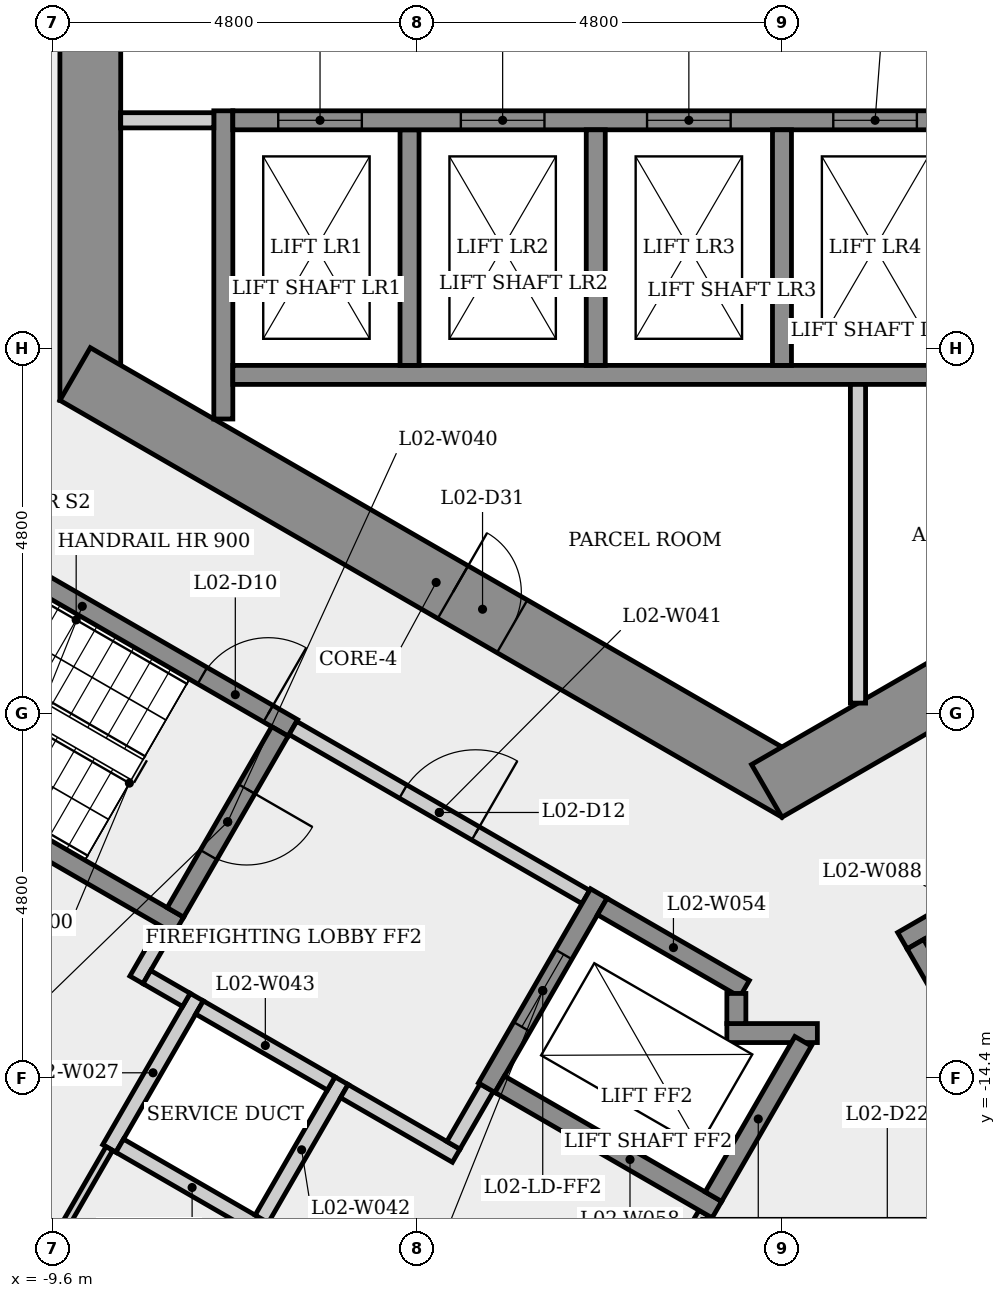
"""IFC4 building model, lengths in metres.
Left out: names, types, materials, properties, quantities, classifications, styles, units other than length and angle.
Written with IfcOpenShell. Run it as: python <this file> out.ifc"""

import sys

from ifc_helpers import new_model, si_unit, direction, frame, frame_2d, origin, place, context, subcontext, project, spatial, rectangle, extrude, element, fill, save


model = new_model("IFC4")
c1 = context("Model", 3, precision=1e-05, world=origin(), true_north=direction((0.0, 1.0)))
c2 = subcontext(c1, "Body", "Model", "MODEL_VIEW")
j1 = project(units=[si_unit("LENGTHUNIT", "METRE"), si_unit("PLANEANGLEUNIT", "RADIAN")], contexts=[c1])
p1 = place(None, origin())
s1 = spatial("IfcSite", under=j1, at=p1, CompositionType="ELEMENT")
p2 = place(p1, origin())
s2 = spatial("IfcBuilding", under=s1, at=p2, CompositionType="ELEMENT")
p3 = place(p2, frame((0.0, 0.0, 11.5)))
s3 = spatial("IfcBuildingStorey", under=s2, at=p3, CompositionType="ELEMENT", Elevation=11.5)
p4 = place(p3, frame((-9.1, 5.485, 0.0), z_axis=(0.0, 0.0, 1.0), x_axis=(0.0, -1.0, 0.0)))
e1 = element("IfcWall", 1, at=p4, inside=s3, PredefinedType="SHEAR", context=c2, shape_type="SweptSolid", body=[
    extrude(rectangle(XDim=10.97, YDim=0.8, at=frame_2d((5.485, 0.0))), origin(), (0.0, 0.0, 1.0), 4.5),
])
p5 = place(p4, frame((4.685, 0.0, 0.0)))
e2 = element("IfcOpeningElement", 2, at=p5, cuts=e1, PredefinedType="OPENING", context=c2, shape_type="SweptSolid", body=[
    extrude(rectangle(XDim=1.6, YDim=2.1, at=frame_2d((0.8, 1.05))), frame((0.0, 0.41, 0.0), z_axis=(0.0, -1.0, 0.0), x_axis=(1.0, 0.0, 0.0)), (0.0, 0.0, 1.0), 0.82),
])
p6 = place(p3, frame((-9.3, -5.138, 0.0), z_axis=(0.0, 0.0, 1.0), x_axis=(0.866023993627, -0.500002442456, 0.0)))
e3 = element("IfcWall", 3, at=p6, inside=s3, PredefinedType="SHEAR", context=c2, shape_type="SweptSolid", body=[
    extrude(rectangle(XDim=10.97, YDim=0.8, at=frame_2d((5.485, 0.0))), origin(), (0.0, 0.0, 1.0), 4.5),
])
p7 = place(p6, frame((5.74, 0.0, 0.0)))
e4 = element("IfcOpeningElement", 4, at=p7, cuts=e3, PredefinedType="OPENING", context=c2, shape_type="SweptSolid", body=[
    extrude(rectangle(XDim=0.9, YDim=2.1, at=frame_2d((0.45, 1.05))), frame((0.0, 0.41, 0.0), z_axis=(0.0, -1.0, 0.0), x_axis=(1.0, 0.0, 0.0)), (0.0, 0.0, 1.0), 0.82),
])
p8 = place(p3, frame((-0.2, -10.623, 0.0), z_axis=(0.0, 0.0, 1.0), x_axis=(0.866023993627, 0.500002442456, 0.0)))
e5 = element("IfcWall", 5, at=p8, inside=s3, PredefinedType="SHEAR", context=c2, shape_type="SweptSolid", body=[
    extrude(rectangle(XDim=10.97, YDim=0.8, at=frame_2d((5.485, 0.0))), origin(), (0.0, 0.0, 1.0), 4.5),
])
p9 = place(p8, frame((7.224, 0.0, 0.0)))
e6 = element("IfcOpeningElement", 6, at=p9, cuts=e5, PredefinedType="OPENING", context=c2, shape_type="SweptSolid", body=[
    extrude(rectangle(XDim=0.9, YDim=2.1, at=frame_2d((0.45, 1.05))), frame((0.0, 0.41, 0.0), z_axis=(0.0, -1.0, 0.0), x_axis=(1.0, 0.0, 0.0)), (0.0, 0.0, 1.0), 0.82),
])
p10 = place(p3, frame((-11.977, -6.595, 0.0), z_axis=(0.0, 0.0, 1.0), x_axis=(0.866025499775, -0.499999833739, 0.0)))
e7 = element("IfcWall", 7, at=p10, inside=s3, PredefinedType="SHEAR", context=c2, shape_type="SweptSolid", body=[
    extrude(rectangle(XDim=6.4, YDim=0.25, at=frame_2d((3.2, 0.0))), origin(), (0.0, 0.0, 1.0), 4.1),
])
p11 = place(p10, frame((5.025, 0.0, 0.0)))
e8 = element("IfcOpeningElement", 8, at=p11, cuts=e7, PredefinedType="OPENING", context=c2, shape_type="SweptSolid", body=[
    extrude(rectangle(XDim=1.0, YDim=2.1, at=frame_2d((0.5, 1.05))), frame((0.0, 0.135, 0.0), z_axis=(0.0, -1.0, 0.0), x_axis=(1.0, 0.0, 0.0)), (0.0, 0.0, 1.0), 0.27),
])
p12 = place(p3, frame((-8.85, -15.329, 0.0), z_axis=(0.0, 0.0, 1.0), x_axis=(0.500077740698, 0.865980515519, 0.0)))
e9 = element("IfcWall", 9, at=p12, inside=s3, PredefinedType="PLUMBINGWALL", context=c2, shape_type="SweptSolid", body=[
    extrude(rectangle(XDim=2.3, YDim=0.2, at=frame_2d((1.15, 0.0))), origin(), (0.0, 0.0, 1.0), 4.1),
])
p13 = place(p3, frame((-8.85, -15.329, 0.0), z_axis=(0.0, 0.0, 1.0), x_axis=(-0.499991453095, -0.866030338286, 0.0)))
e10 = element("IfcWall", 10, at=p13, inside=s3, PredefinedType="PARTITIONING", context=c2, shape_type="SweptSolid", body=[
    extrude(rectangle(XDim=3.98, YDim=0.1, at=frame_2d((1.99, 0.0))), origin(), (0.0, 0.0, 1.0), 4.1),
])
p14 = place(p3, frame((-8.493, -13.11, 0.0), z_axis=(0.0, 0.0, 1.0), x_axis=(0.500067724834, 0.865986299303, 0.0)))
e11 = element("IfcWall", 11, at=p14, inside=s3, PredefinedType="PARTITIONING", context=c2, shape_type="SweptSolid", body=[
    extrude(rectangle(XDim=0.775, YDim=0.2, at=frame_2d((0.388, 0.0))), origin(), (0.0, 0.0, 1.0), 4.1),
])
p15 = place(p3, frame((-7.935, -12.393, 0.0), z_axis=(0.0, 0.0, 1.0), x_axis=(-0.866025499775, 0.499999833739, 0.0)))
e12 = element("IfcWall", 12, at=p15, inside=s3, PredefinedType="SHEAR", context=c2, shape_type="SweptSolid", body=[
    extrude(rectangle(XDim=6.4, YDim=0.25, at=frame_2d((3.2, 0.0))), origin(), (0.0, 0.0, 1.0), 4.1),
])
p16 = place(p3, frame((-7.836, -13.373, 0.0), z_axis=(0.0, 0.0, 1.0), x_axis=(-0.866232998003, 0.499640263761, 0.0)))
e13 = element("IfcWall", 13, at=p16, inside=s3, PredefinedType="PARTITIONING", context=c2, shape_type="SweptSolid", body=[
    extrude(rectangle(XDim=0.6, YDim=0.2, at=frame_2d((0.3, 0.0))), origin(), (0.0, 0.0, 1.0), 4.1),
])
p17 = place(p3, frame((-7.35, -5.73, 0.0), z_axis=(0.0, 0.0, 1.0), x_axis=(0.0, 1.0, 0.0)))
e14 = element("IfcWall", 14, at=p17, inside=s3, PredefinedType="SHEAR", context=c2, shape_type="SweptSolid", body=[
    extrude(rectangle(XDim=4.055, YDim=0.25, at=frame_2d((2.028, 0.0))), origin(), (0.0, 0.0, 1.0), 4.1),
])
p18 = place(p3, frame((-7.475, -1.8, 0.0), z_axis=(0.0, 0.0, 1.0), x_axis=(-1.0, 0.0, 0.0)))
e15 = element("IfcWall", 15, at=p18, inside=s3, PredefinedType="PARTITIONING", context=c2, shape_type="SweptSolid", body=[
    extrude(rectangle(XDim=1.225, YDim=0.2, at=frame_2d((0.613, 0.0))), origin(), (0.0, 0.0, 1.0), 4.1),
])
p19 = place(p3, frame((-6.808, -16.392, 0.0), z_axis=(0.0, 0.0, 1.0), x_axis=(-0.866008176907, 0.50002983664, 0.0)))
e16 = element("IfcWall", 16, at=p19, inside=s3, PredefinedType="PLUMBINGWALL", context=c2, shape_type="SweptSolid", body=[
    extrude(rectangle(XDim=2.2, YDim=0.2, at=frame_2d((1.1, 0.0))), origin(), (0.0, 0.0, 1.0), 4.1),
])
p20 = place(p3, frame((-6.605, -9.841, 0.0), z_axis=(0.0, 0.0, 1.0), x_axis=(-0.499996545922, -0.866027397988, 0.0)))
e17 = element("IfcWall", 17, at=p20, inside=s3, PredefinedType="SHEAR", context=c2, shape_type="SweptSolid", body=[
    extrude(rectangle(XDim=2.75, YDim=0.25, at=frame_2d((1.375, 0.0))), origin(), (0.0, 0.0, 1.0), 4.1),
])
p21 = place(p20, frame((0.875, 0.0, 0.0)))
e18 = element("IfcOpeningElement", 18, at=p21, cuts=e17, PredefinedType="OPENING", context=c2, shape_type="SweptSolid", body=[
    extrude(rectangle(XDim=1.0, YDim=2.1, at=frame_2d((0.5, 1.05))), frame((0.0, 0.135, 0.0), z_axis=(0.0, -1.0, 0.0), x_axis=(1.0, 0.0, 0.0)), (0.0, 0.0, 1.0), 0.27),
])
p22 = place(p3, frame((-6.435, -9.795, 0.0), z_axis=(0.0, 0.0, 1.0), x_axis=(0.866012907634, -0.500021643343, 0.0)))
e19 = element("IfcWall", 19, at=p22, inside=s3, PredefinedType="PARTITIONING", context=c2, shape_type="SweptSolid", body=[
    extrude(rectangle(XDim=4.45, YDim=0.2, at=frame_2d((2.225, 0.0))), origin(), (0.0, 0.0, 1.0), 4.1),
])
p23 = place(p22, frame((1.675, 0.0, 0.0)))
e20 = element("IfcOpeningElement", 20, at=p23, cuts=e19, PredefinedType="OPENING", context=c2, shape_type="SweptSolid", body=[
    extrude(rectangle(XDim=1.1, YDim=2.1, at=frame_2d((0.55, 1.05))), frame((0.0, 0.11, 0.0), z_axis=(0.0, -1.0, 0.0), x_axis=(1.0, 0.0, 0.0)), (0.0, 0.0, 1.0), 0.22),
])
p24 = place(p3, frame((-5.795, -14.437, 0.0), z_axis=(0.0, 0.0, 1.0), x_axis=(-0.500027713859, -0.866009402589, 0.0)))
e21 = element("IfcWall", 21, at=p24, inside=s3, PredefinedType="PLUMBINGWALL", context=c2, shape_type="SweptSolid", body=[
    extrude(rectangle(XDim=2.1, YDim=0.2, at=frame_2d((1.05, 0.0))), origin(), (0.0, 0.0, 1.0), 4.1),
])
p25 = place(p3, frame((-5.931, -14.473, 0.0), z_axis=(0.0, 0.0, 1.0), x_axis=(-0.866041268327, 0.499972520799, 0.0)))
e22 = element("IfcWall", 22, at=p25, inside=s3, PredefinedType="PLUMBINGWALL", context=c2, shape_type="SweptSolid", body=[
    extrude(rectangle(XDim=2.0, YDim=0.2, at=frame_2d((1.0, 0.0))), origin(), (0.0, 0.0, 1.0), 4.1),
])
p26 = place(p3, frame((-7.225, -5.15, 0.0), z_axis=(0.0, 0.0, 1.0), x_axis=(1.0, 0.0, 0.0)))
e23 = element("IfcWall", 23, at=p26, inside=s3, PredefinedType="SHEAR", context=c2, shape_type="SweptSolid", body=[
    extrude(rectangle(XDim=14.7, YDim=0.25, at=frame_2d((7.35, 0.0))), origin(), (0.0, 0.0, 1.0), 4.1),
])
p27 = place(p3, frame((-4.9, -1.925, 0.0), z_axis=(0.0, 0.0, 1.0), x_axis=(0.0, -1.0, 0.0)))
e24 = element("IfcWall", 24, at=p27, inside=s3, PredefinedType="SHEAR", context=c2, shape_type="SweptSolid", body=[
    extrude(rectangle(XDim=3.1, YDim=0.25, at=frame_2d((1.55, 0.0))), origin(), (0.0, 0.0, 1.0), 4.5),
])
p28 = place(p3, frame((-7.225, -1.8, 0.0), z_axis=(0.0, 0.0, 1.0), x_axis=(1.0, 0.0, 0.0)))
e25 = element("IfcWall", 25, at=p28, inside=s3, PredefinedType="SHEAR", context=c2, shape_type="SweptSolid", body=[
    extrude(rectangle(XDim=14.7, YDim=0.25, at=frame_2d((7.35, 0.0))), origin(), (0.0, 0.0, 1.0), 4.1),
])
p29 = place(p28, frame((0.597, 0.0, 0.0)))
e26 = element("IfcOpeningElement", 26, at=p29, cuts=e25, PredefinedType="OPENING", context=c2, shape_type="SweptSolid", body=[
    extrude(rectangle(XDim=1.1, YDim=2.1, at=frame_2d((0.55, 1.05))), frame((0.0, 0.135, 0.0), z_axis=(0.0, -1.0, 0.0), x_axis=(1.0, 0.0, 0.0)), (0.0, 0.0, 1.0), 0.27),
])
p30 = place(p28, frame((3.0, 0.0, 0.0)))
e27 = element("IfcOpeningElement", 27, at=p30, cuts=e25, PredefinedType="OPENING", context=c2, shape_type="SweptSolid", body=[
    extrude(rectangle(XDim=1.1, YDim=2.1, at=frame_2d((0.55, 1.05))), frame((0.0, 0.135, 0.0), z_axis=(0.0, -1.0, 0.0), x_axis=(1.0, 0.0, 0.0)), (0.0, 0.0, 1.0), 0.27),
])
p31 = place(p28, frame((5.45, 0.0, 0.0)))
e28 = element("IfcOpeningElement", 28, at=p31, cuts=e25, PredefinedType="OPENING", context=c2, shape_type="SweptSolid", body=[
    extrude(rectangle(XDim=1.1, YDim=2.1, at=frame_2d((0.55, 1.05))), frame((0.0, 0.135, 0.0), z_axis=(0.0, -1.0, 0.0), x_axis=(1.0, 0.0, 0.0)), (0.0, 0.0, 1.0), 0.27),
])
p32 = place(p28, frame((7.9, 0.0, 0.0)))
e29 = element("IfcOpeningElement", 29, at=p32, cuts=e25, PredefinedType="OPENING", context=c2, shape_type="SweptSolid", body=[
    extrude(rectangle(XDim=1.1, YDim=2.1, at=frame_2d((0.55, 1.05))), frame((0.0, 0.135, 0.0), z_axis=(0.0, -1.0, 0.0), x_axis=(1.0, 0.0, 0.0)), (0.0, 0.0, 1.0), 0.27),
])
p33 = place(p28, frame((10.35, 0.0, 0.0)))
e30 = element("IfcOpeningElement", 30, at=p33, cuts=e25, PredefinedType="OPENING", context=c2, shape_type="SweptSolid", body=[
    extrude(rectangle(XDim=1.1, YDim=2.1, at=frame_2d((0.55, 1.05))), frame((0.0, 0.135, 0.0), z_axis=(0.0, -1.0, 0.0), x_axis=(1.0, 0.0, 0.0)), (0.0, 0.0, 1.0), 0.27),
])
p34 = place(p3, frame((-4.286, -15.423, 0.0), z_axis=(0.0, 0.0, 1.0), x_axis=(-0.866025371046, 0.500000056704, 0.0)))
e31 = element("IfcWall", 31, at=p34, inside=s3, PredefinedType="PARTITIONING", context=c2, shape_type="SweptSolid", body=[
    extrude(rectangle(XDim=1.7, YDim=0.2, at=frame_2d((0.85, 0.0))), origin(), (0.0, 0.0, 1.0), 4.1),
])
p35 = place(p3, frame((-3.885, -14.529, 0.0), z_axis=(0.0, 0.0, 1.0), x_axis=(-0.499859285417, -0.866106630146, 0.0)))
e32 = element("IfcWall", 32, at=p35, inside=s3, PredefinedType="PARTITIONING", context=c2, shape_type="SweptSolid", body=[
    extrude(rectangle(XDim=0.875, YDim=0.2, at=frame_2d((0.438, 0.0))), origin(), (0.0, 0.0, 1.0), 4.1),
])
p36 = place(p3, frame((-2.41, -11.974, 0.0), z_axis=(0.0, 0.0, 1.0), x_axis=(-0.500001826776, -0.866024349092, 0.0)))
e33 = element("IfcWall", 33, at=p36, inside=s3, PredefinedType="SHEAR", context=c2, shape_type="SweptSolid", body=[
    extrude(rectangle(XDim=2.95, YDim=0.25, at=frame_2d((1.475, 0.0))), origin(), (0.0, 0.0, 1.0), 4.1),
])
p37 = place(p36, frame((0.925, 0.0, 0.0)))
e34 = element("IfcOpeningElement", 34, at=p37, cuts=e33, PredefinedType="OPENING", context=c2, shape_type="SweptSolid", body=[
    extrude(rectangle(XDim=1.1, YDim=2.1, at=frame_2d((0.55, 1.05))), frame((0.0, 0.135, 0.0), z_axis=(0.0, -1.0, 0.0), x_axis=(1.0, 0.0, 0.0)), (0.0, 0.0, 1.0), 0.27),
])
p38 = place(p3, frame((-2.364, -12.145, 0.0), z_axis=(0.0, 0.0, 1.0), x_axis=(0.86603892542, -0.499976579108, 0.0)))
e35 = element("IfcWall", 35, at=p38, inside=s3, PredefinedType="SHEAR", context=c2, shape_type="SweptSolid", body=[
    extrude(rectangle(XDim=2.162, YDim=0.25, at=frame_2d((1.081, 0.0))), origin(), (0.0, 0.0, 1.0), 4.1),
])
p39 = place(p3, frame((-2.45, -1.925, 0.0), z_axis=(0.0, 0.0, 1.0), x_axis=(0.0, -1.0, 0.0)))
e36 = element("IfcWall", 36, at=p39, inside=s3, PredefinedType="SHEAR", context=c2, shape_type="SweptSolid", body=[
    extrude(rectangle(XDim=3.1, YDim=0.25, at=frame_2d((1.55, 0.0))), origin(), (0.0, 0.0, 1.0), 4.5),
])
p40 = place(p3, frame((-1.155, -16.401, 0.0), z_axis=(0.0, 0.0, 1.0), x_axis=(0.500134748329, 0.865947592822, 0.0)))
e37 = element("IfcWall", 37, at=p40, inside=s3, PredefinedType="PARTITIONING", context=c2, shape_type="SweptSolid", body=[
    extrude(rectangle(XDim=0.256, YDim=0.15, at=frame_2d((0.128, 0.0))), origin(), (0.0, 0.0, 1.0), 4.1),
])
p41 = place(p3, frame((-0.856, -16.133, 0.0), z_axis=(0.0, 0.0, 1.0), x_axis=(-0.866021716278, 0.500006386895, 0.0)))
e38 = element("IfcWall", 38, at=p41, inside=s3, PredefinedType="SHEAR", context=c2, shape_type="SweptSolid", body=[
    extrude(rectangle(XDim=3.3, YDim=0.25, at=frame_2d((1.65, 0.0))), origin(), (0.0, 0.0, 1.0), 4.1),
])
p42 = place(p3, frame((-0.725, -13.81, 0.0), z_axis=(0.0, 0.0, 1.0), x_axis=(1.0, 0.0, 0.0)))
e39 = element("IfcWall", 39, at=p42, inside=s3, PredefinedType="SHEAR", context=c2, shape_type="SweptSolid", body=[
    extrude(rectangle(XDim=1.191, YDim=0.25, at=frame_2d((0.595, 0.0))), origin(), (0.0, 0.0, 1.0), 4.1),
])
p43 = place(p3, frame((-0.6, -13.289, 0.0), z_axis=(0.0, 0.0, 1.0), x_axis=(0.0, -1.0, 0.0)))
e40 = element("IfcWall", 40, at=p43, inside=s3, PredefinedType="SHEAR", context=c2, shape_type="SweptSolid", body=[
    extrude(rectangle(XDim=0.396, YDim=0.25, at=frame_2d((0.198, 0.0))), origin(), (0.0, 0.0, 1.0), 4.5),
])
p44 = place(p3, frame((0.0, -1.925, 0.0), z_axis=(0.0, 0.0, 1.0), x_axis=(0.0, -1.0, 0.0)))
e41 = element("IfcWall", 41, at=p44, inside=s3, PredefinedType="SHEAR", context=c2, shape_type="SweptSolid", body=[
    extrude(rectangle(XDim=3.1, YDim=0.25, at=frame_2d((1.55, 0.0))), origin(), (0.0, 0.0, 1.0), 4.5),
])
p45 = place(p3, frame((0.278, -13.918, 0.0), z_axis=(0.0, 0.0, 1.0), x_axis=(-0.49998806882, -0.866032292145, 0.0)))
e42 = element("IfcWall", 42, at=p45, inside=s3, PredefinedType="SHEAR", context=c2, shape_type="SweptSolid", body=[
    extrude(rectangle(XDim=2.36, YDim=0.25, at=frame_2d((1.18, 0.0))), origin(), (0.0, 0.0, 1.0), 4.5),
])
p46 = place(p3, frame((1.0, -5.275, 0.0), z_axis=(0.0, 0.0, 1.0), x_axis=(0.0, -1.0, 0.0)))
e43 = element("IfcWall", 43, at=p46, inside=s3, PredefinedType="PARTITIONING", context=c2, shape_type="SweptSolid", body=[
    extrude(rectangle(XDim=4.194, YDim=0.2, at=frame_2d((2.097, 0.0))), origin(), (0.0, 0.0, 1.0), 4.1),
])
p47 = place(p3, frame((1.585, -12.595, 0.0), z_axis=(0.0, 0.0, 1.0), x_axis=(0.866036417653, 0.499980922934, 0.0)))
e44 = element("IfcWall", 44, at=p47, inside=s3, PredefinedType="SHEAR", context=c2, shape_type="SweptSolid", body=[
    extrude(rectangle(XDim=6.65, YDim=0.25, at=frame_2d((3.325, 0.0))), origin(), (0.0, 0.0, 1.0), 4.1),
])
p48 = place(p47, frame((5.275, 0.0, 0.0)))
e45 = element("IfcOpeningElement", 45, at=p48, cuts=e44, PredefinedType="OPENING", context=c2, shape_type="SweptSolid", body=[
    extrude(rectangle(XDim=1.0, YDim=2.1, at=frame_2d((0.5, 1.05))), frame((0.0, 0.135, 0.0), z_axis=(0.0, -1.0, 0.0), x_axis=(1.0, 0.0, 0.0)), (0.0, 0.0, 1.0), 0.27),
])
p49 = place(p3, frame((3.256, -15.239, 0.0), z_axis=(0.0, 0.0, 1.0), x_axis=(-0.50002537861, 0.866010750942, 0.0)))
e46 = element("IfcWall", 46, at=p49, inside=s3, PredefinedType="SHEAR", context=c2, shape_type="SweptSolid", body=[
    extrude(rectangle(XDim=3.0, YDim=0.25, at=frame_2d((1.5, 0.0))), origin(), (0.0, 0.0, 1.0), 4.1),
])
p50 = place(p29, origin())
e47 = element("IfcDoor", 47, at=p50, inside=s3, OperationType="SLIDING_TO_LEFT", PredefinedType="DOOR", context=c2, shape_type="SweptSolid", body=[
    extrude(rectangle(XDim=1.1, YDim=2.1, at=frame_2d((0.55, 1.05))), frame((0.0, 0.025, 0.0), z_axis=(0.0, -1.0, 0.0), x_axis=(1.0, 0.0, 0.0)), (0.0, 0.0, 1.0), 0.05),
])
fill(e26, e47)
p51 = place(p30, origin())
e48 = element("IfcDoor", 48, at=p51, inside=s3, OperationType="SLIDING_TO_LEFT", PredefinedType="DOOR", context=c2, shape_type="SweptSolid", body=[
    extrude(rectangle(XDim=1.1, YDim=2.1, at=frame_2d((0.55, 1.05))), frame((0.0, 0.025, 0.0), z_axis=(0.0, -1.0, 0.0), x_axis=(1.0, 0.0, 0.0)), (0.0, 0.0, 1.0), 0.05),
])
fill(e27, e48)
p52 = place(p31, origin())
e49 = element("IfcDoor", 49, at=p52, inside=s3, OperationType="SLIDING_TO_LEFT", PredefinedType="DOOR", context=c2, shape_type="SweptSolid", body=[
    extrude(rectangle(XDim=1.1, YDim=2.1, at=frame_2d((0.55, 1.05))), frame((0.0, 0.025, 0.0), z_axis=(0.0, -1.0, 0.0), x_axis=(1.0, 0.0, 0.0)), (0.0, 0.0, 1.0), 0.05),
])
fill(e28, e49)
p53 = place(p32, origin())
e50 = element("IfcDoor", 50, at=p53, inside=s3, OperationType="SLIDING_TO_LEFT", PredefinedType="DOOR", context=c2, shape_type="SweptSolid", body=[
    extrude(rectangle(XDim=1.1, YDim=2.1, at=frame_2d((0.55, 1.05))), frame((0.0, 0.025, 0.0), z_axis=(0.0, -1.0, 0.0), x_axis=(1.0, 0.0, 0.0)), (0.0, 0.0, 1.0), 0.05),
])
fill(e29, e50)
p54 = place(p11, origin())
e51 = element("IfcDoor", 51, at=p54, inside=s3, OperationType="SINGLE_SWING_RIGHT", PredefinedType="DOOR", context=c2, shape_type="SweptSolid", body=[
    extrude(rectangle(XDim=1.0, YDim=2.1, at=frame_2d((0.5, 1.05))), frame((0.0, 0.025, 0.0), z_axis=(0.0, -1.0, 0.0), x_axis=(1.0, 0.0, 0.0)), (0.0, 0.0, 1.0), 0.05),
])
fill(e8, e51)
p55 = place(p21, origin())
e52 = element("IfcDoor", 52, at=p55, inside=s3, OperationType="SINGLE_SWING_LEFT", PredefinedType="DOOR", context=c2, shape_type="SweptSolid", body=[
    extrude(rectangle(XDim=1.0, YDim=2.1, at=frame_2d((0.5, 1.05))), frame((0.0, 0.025, 0.0), z_axis=(0.0, -1.0, 0.0), x_axis=(1.0, 0.0, 0.0)), (0.0, 0.0, 1.0), 0.05),
])
fill(e18, e52)
p56 = place(p23, origin())
e53 = element("IfcDoor", 53, at=p56, inside=s3, OperationType="SINGLE_SWING_RIGHT", PredefinedType="DOOR", context=c2, shape_type="SweptSolid", body=[
    extrude(rectangle(XDim=1.1, YDim=2.1, at=frame_2d((0.55, 1.05))), frame((0.0, 0.025, 0.0), z_axis=(0.0, -1.0, 0.0), x_axis=(1.0, 0.0, 0.0)), (0.0, 0.0, 1.0), 0.05),
])
fill(e20, e53)
p57 = place(p37, origin())
e54 = element("IfcDoor", 54, at=p57, inside=s3, OperationType="SLIDING_TO_LEFT", PredefinedType="DOOR", context=c2, shape_type="SweptSolid", body=[
    extrude(rectangle(XDim=1.1, YDim=2.1, at=frame_2d((0.55, 1.05))), frame((0.0, 0.025, 0.0), z_axis=(0.0, -1.0, 0.0), x_axis=(1.0, 0.0, 0.0)), (0.0, 0.0, 1.0), 0.05),
])
fill(e34, e54)
p58 = place(p7, origin())
e55 = element("IfcDoor", 55, at=p58, inside=s3, OperationType="SINGLE_SWING_LEFT", PredefinedType="DOOR", context=c2, shape_type="SweptSolid", body=[
    extrude(rectangle(XDim=0.9, YDim=2.1, at=frame_2d((0.45, 1.05))), frame((0.0, 0.025, 0.0), z_axis=(0.0, -1.0, 0.0), x_axis=(1.0, 0.0, 0.0)), (0.0, 0.0, 1.0), 0.05),
])
fill(e4, e55)
save(model, sys.argv[1])
